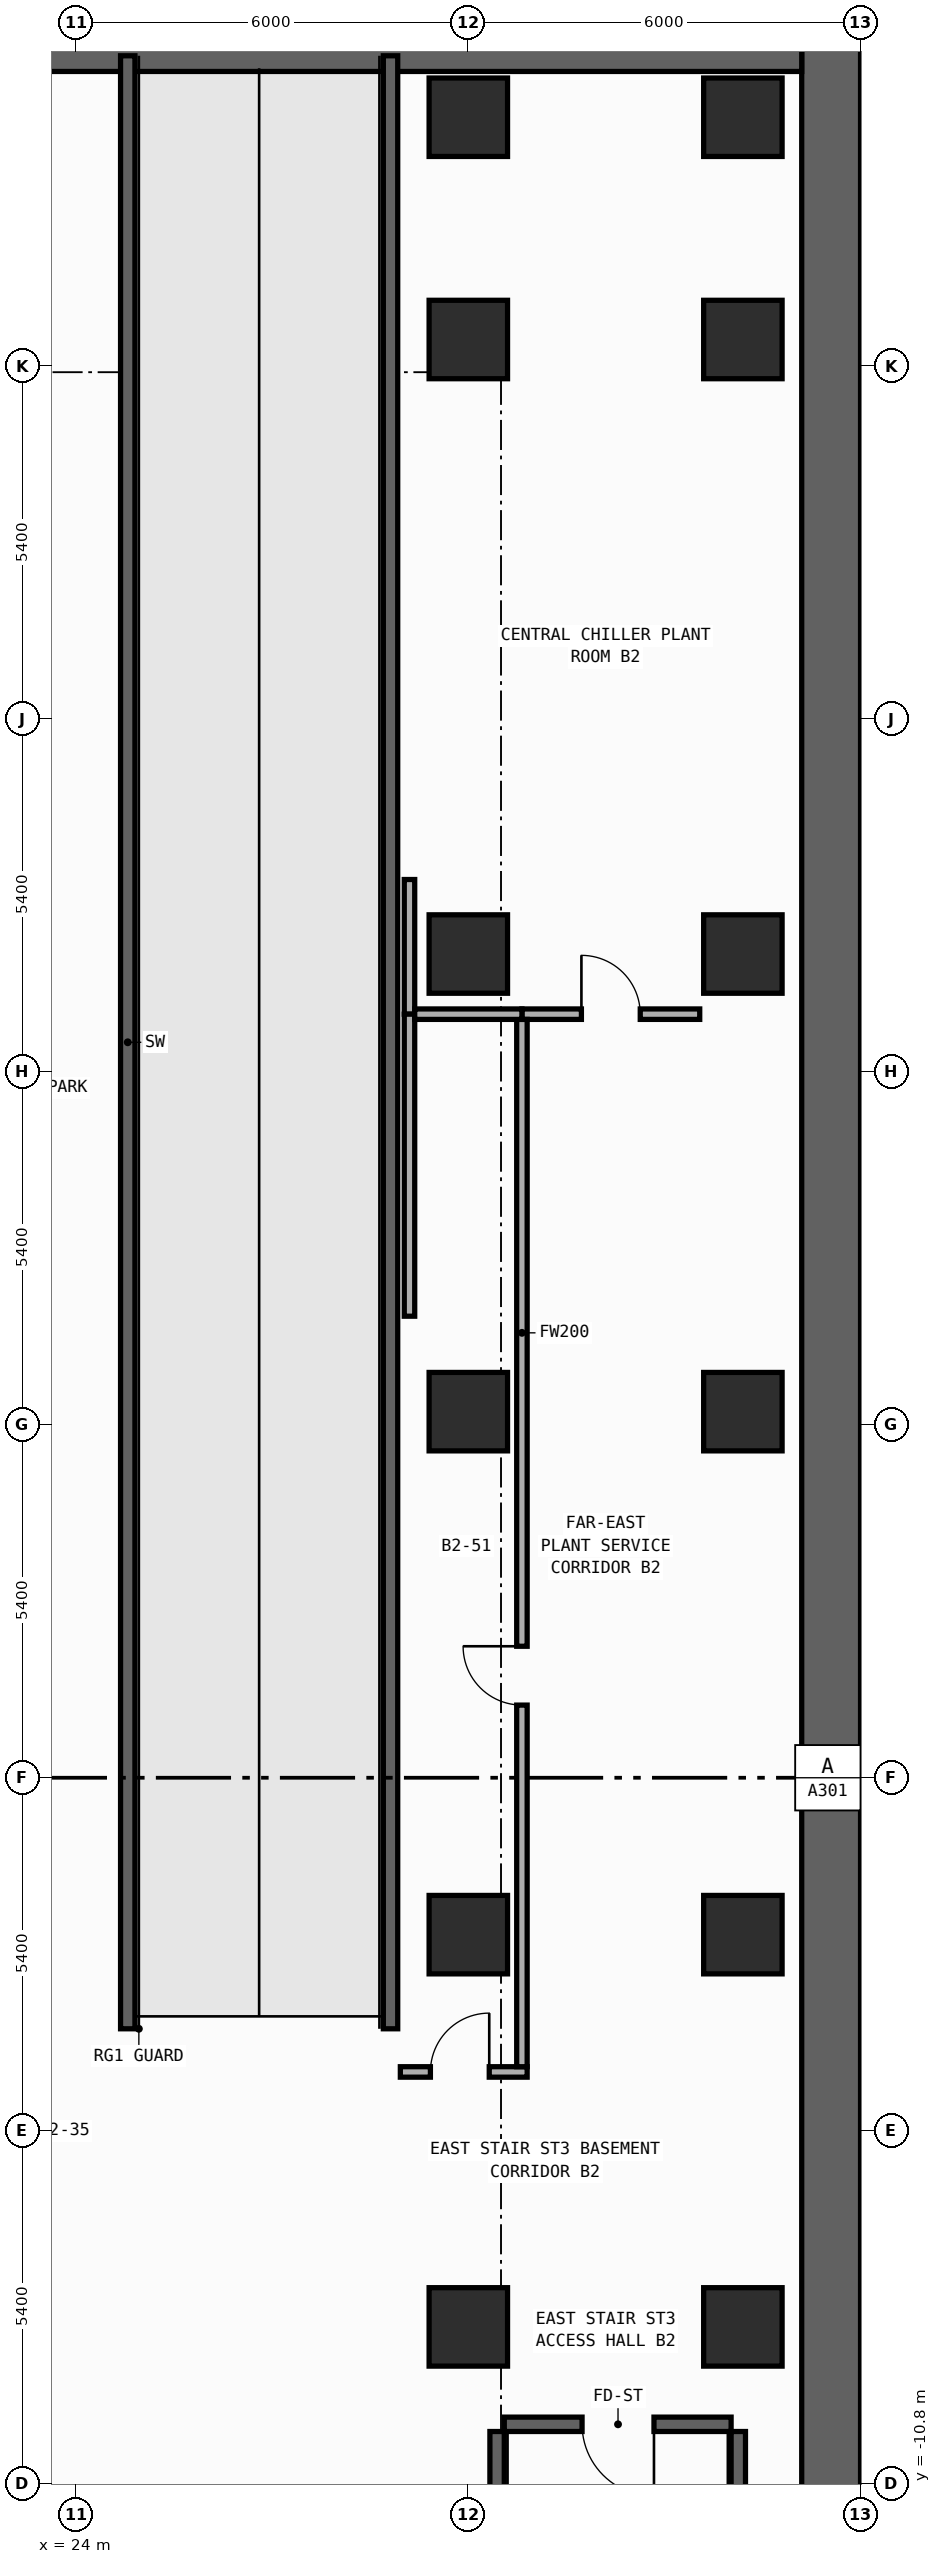
"""IFC4 building model, lengths in metres.
Left out: names, types, materials, properties, quantities, classifications, styles, units other than length and angle.
Written with IfcOpenShell. Run it as: python <this file> out.ifc"""

import sys

from ifc_helpers import new_model, si_unit, direction, frame, frame_2d, origin, origin_2d, place, context, subcontext, project, spatial, polyline, rectangle, outline, extrude, element, fill, save


model = new_model("IFC4")
c1 = context("Model", 3, precision=1e-05, world=origin(), true_north=direction((0.0, 1.0)))
c2 = subcontext(c1, "Body", "Model", "MODEL_VIEW")
j1 = project(units=[si_unit("LENGTHUNIT", "METRE"), si_unit("PLANEANGLEUNIT", "RADIAN")], contexts=[c1])
p1 = place(None, origin())
s1 = spatial("IfcSite", under=j1, at=p1, CompositionType="ELEMENT")
p2 = place(p1, origin())
s2 = spatial("IfcBuilding", under=s1, at=p2, CompositionType="ELEMENT")
p3 = place(p2, frame((0.0, 0.0, -9.0)))
s3 = spatial("IfcBuildingStorey", under=s2, at=p3, CompositionType="ELEMENT", Elevation=-9.0)
p4 = place(p3, frame((34.02, -9.89, 0.0), z_axis=(0.0, 0.0, 1.0), x_axis=(-1.0, 0.0, 0.0)))
e1 = element("IfcWall", 1, at=p4, inside=s3, PredefinedType="SHEAR", context=c2, shape_type="SweptSolid", body=[
    extrude(rectangle(XDim=3.47, YDim=0.22, at=frame_2d((1.735, 0.0))), origin(), (0.0, 0.0, 1.0), 4.2),
])
p5 = place(p4, frame((1.18, 0.0, 0.0)))
e2 = element("IfcOpeningElement", 2, at=p5, cuts=e1, PredefinedType="OPENING", context=c2, shape_type="SweptSolid", body=[
    extrude(rectangle(XDim=1.1, YDim=2.2, at=frame_2d((0.55, 1.1))), frame((0.0, 0.12, 0.0), z_axis=(0.0, -1.0, 0.0), x_axis=(1.0, 0.0, 0.0)), (0.0, 0.0, 1.0), 0.24),
])
for number, where, z_axis, x_axis in (
    (3, (30.44, -19.8, 0.0), (0.0, 0.0, 1.0), (0.0, 1.0, 0.0)),
    (4, (34.13, -19.8, 0.0), (0.0, 0.0, 1.0), (0.0, 1.0, 0.0)),
):
    element("IfcWall", number, at=place(p3, frame(where, z_axis=z_axis, x_axis=x_axis)), inside=s3, PredefinedType="SHEAR", context=c2, shape_type="SweptSolid", body=[
        extrude(rectangle(XDim=9.8, YDim=0.22, at=frame_2d((4.9, 0.0))), origin(), (0.0, 0.0, 1.0), 4.2),
    ])
p6 = place(p3, frame((35.55, -27.0, 0.0), z_axis=(0.0, 0.0, 1.0), x_axis=(0.0, 1.0, 0.0)))
e5 = element("IfcWall", 5, at=p6, inside=s3, PredefinedType="SHEAR", context=c2, shape_type="SweptSolid", body=[
    extrude(rectangle(XDim=54.0, YDim=0.9, at=frame_2d((27.0, 0.0))), origin(), (0.0, 0.0, 1.0), 4.2),
])
p7 = place(p3, frame((-35.1, 26.55, 0.0), z_axis=(0.0, 0.0, 1.0), x_axis=(1.0, 0.0, 0.0)))
e6 = element("IfcWall", 6, at=p7, inside=s3, PredefinedType="SHEAR", context=c2, shape_type="SweptSolid", body=[
    extrude(rectangle(XDim=70.2, YDim=0.9, at=frame_2d((35.1, 0.0))), origin(), (0.0, 0.0, 1.0), 4.2),
])
for number, where, z_axis, x_axis in (
    (7, (30.0, -8.4, 0.0), (0.0, 0.0, 1.0), (1.0, 0.0, 0.0)),
    (8, (30.0, -2.4, 0.0), (0.0, 0.0, 1.0), (1.0, 0.0, 0.0)),
    (9, (30.0, 5.6, 0.0), (0.0, 0.0, 1.0), (1.0, 0.0, 0.0)),
    (10, (30.0, 12.6, 0.0), (0.0, 0.0, 1.0), (1.0, 0.0, 0.0)),
    (11, (30.0, 22.0, 0.0), (0.0, 0.0, 1.0), (1.0, 0.0, 0.0)),
    (12, (30.0, 25.4, 0.0), (0.0, 0.0, 1.0), (1.0, 0.0, 0.0)),
    (13, (34.2, -8.4, 0.0), (0.0, 0.0, 1.0), (1.0, 0.0, 0.0)),
    (14, (34.2, -2.4, 0.0), (0.0, 0.0, 1.0), (1.0, 0.0, 0.0)),
    (15, (34.2, 5.6, 0.0), (0.0, 0.0, 1.0), (1.0, 0.0, 0.0)),
    (16, (34.2, 12.6, 0.0), (0.0, 0.0, 1.0), (1.0, 0.0, 0.0)),
    (17, (34.2, 22.0, 0.0), (0.0, 0.0, 1.0), (1.0, 0.0, 0.0)),
    (18, (34.2, 25.4, 0.0), (0.0, 0.0, 1.0), (1.0, 0.0, 0.0)),
):
    element("IfcColumn", number, at=place(p3, frame(where, z_axis=z_axis, x_axis=x_axis)), inside=s3, PredefinedType="COLUMN", context=c2, shape_type="SweptSolid", body=[
        extrude(rectangle(XDim=1.2, YDim=1.2, at=origin_2d()), origin(), (0.0, 0.0, 1.0), 4.5),
    ])
for number, where, z_axis, x_axis in (
    (19, (24.79, -3.84, 0.0), (0.0, 0.0, 1.0), (0.0, 1.0, 0.0)),
    (20, (28.81, -3.84, 0.0), (0.0, 0.0, 1.0), (0.0, 1.0, 0.0)),
):
    element("IfcWall", number, at=place(p3, frame(where, z_axis=z_axis, x_axis=x_axis)), inside=s3, PredefinedType="SHEAR", context=c2, shape_type="SweptSolid", body=[
        extrude(outline(polyline([(0.0, 0.0), (30.18, 0.0), (30.18, 4.2), (0.0, 0.02), (0.0, 0.0)])), frame((0.0, 0.11, 0.0), z_axis=(0.0, -1.0, 0.0), x_axis=(1.0, 0.0, 0.0)), (0.0, 0.0, 1.0), 0.22),
    ])
p8 = place(p3, frame((29.1, 11.68, 0.0), z_axis=(0.0, 0.0, 1.0), x_axis=(0.0, 1.0, 0.0)))
e21 = element("IfcWall", 21, at=p8, inside=s3, PredefinedType="PARTITIONING", context=c2, shape_type="SweptSolid", body=[
    extrude(rectangle(XDim=2.06, YDim=0.16, at=frame_2d((1.03, 0.0))), origin(), (0.0, 0.0, 1.0), 4.2),
])
p9 = place(p3, frame((29.1, 7.06, 0.0), z_axis=(0.0, 0.0, 1.0), x_axis=(0.0, 1.0, 0.0)))
e22 = element("IfcWall", 22, at=p9, inside=s3, PredefinedType="PARTITIONING", context=c2, shape_type="SweptSolid", body=[
    extrude(rectangle(XDim=4.62, YDim=0.16, at=frame_2d((2.31, 0.0))), origin(), (0.0, 0.0, 1.0), 4.2),
])
p10 = place(p3, frame((28.96, -4.5, 0.0), z_axis=(0.0, 0.0, 1.0), x_axis=(1.0, 0.0, 0.0)))
e23 = element("IfcWall", 23, at=p10, inside=s3, PredefinedType="PARTITIONING", context=c2, shape_type="SweptSolid", body=[
    extrude(rectangle(XDim=1.94, YDim=0.16, at=frame_2d((0.97, 0.0))), origin(), (0.0, 0.0, 1.0), 4.2),
])
p11 = place(p10, frame((0.46, 0.0, 0.0)))
e24 = element("IfcOpeningElement", 24, at=p11, cuts=e23, PredefinedType="OPENING", context=c2, shape_type="SweptSolid", body=[
    extrude(rectangle(XDim=0.9, YDim=2.15, at=frame_2d((0.45, 1.075))), frame((0.0, 0.09, 0.0), z_axis=(0.0, -1.0, 0.0), x_axis=(1.0, 0.0, 0.0)), (0.0, 0.0, 1.0), 0.18),
])
p12 = place(p3, frame((30.82, 11.68, 0.0), z_axis=(0.0, 0.0, 1.0), x_axis=(1.0, 0.0, 0.0)))
e25 = element("IfcWall", 25, at=p12, inside=s3, PredefinedType="PARTITIONING", context=c2, shape_type="SweptSolid", body=[
    extrude(rectangle(XDim=2.72, YDim=0.16, at=frame_2d((1.36, 0.0))), origin(), (0.0, 0.0, 1.0), 4.2),
])
p13 = place(p12, frame((0.91, 0.0, 0.0)))
e26 = element("IfcOpeningElement", 26, at=p13, cuts=e25, PredefinedType="OPENING", context=c2, shape_type="SweptSolid", body=[
    extrude(rectangle(XDim=0.9, YDim=2.15, at=frame_2d((0.45, 1.075))), frame((0.0, 0.09, 0.0), z_axis=(0.0, -1.0, 0.0), x_axis=(1.0, 0.0, 0.0)), (0.0, 0.0, 1.0), 0.18),
])
p14 = place(p3, frame((30.82, -4.42, 0.0), z_axis=(0.0, 0.0, 1.0), x_axis=(0.0, 1.0, 0.0)))
e27 = element("IfcWall", 27, at=p14, inside=s3, PredefinedType="PARTITIONING", context=c2, shape_type="SweptSolid", body=[
    extrude(rectangle(XDim=16.02, YDim=0.16, at=frame_2d((8.01, 0.0))), origin(), (0.0, 0.0, 1.0), 4.2),
])
p15 = place(p14, frame((5.531, 0.0, 0.0)))
e28 = element("IfcOpeningElement", 28, at=p15, cuts=e27, PredefinedType="OPENING", context=c2, shape_type="SweptSolid", body=[
    extrude(rectangle(XDim=0.9, YDim=2.15, at=frame_2d((0.45, 1.075))), frame((0.0, 0.09, 0.0), z_axis=(0.0, -1.0, 0.0), x_axis=(1.0, 0.0, 0.0)), (0.0, 0.0, 1.0), 0.18),
])
p16 = place(p3, frame((29.18, 11.68, 0.0), z_axis=(0.0, 0.0, 1.0), x_axis=(1.0, 0.0, 0.0)))
e29 = element("IfcWall", 29, at=p16, inside=s3, PredefinedType="PARTITIONING", context=c2, shape_type="SweptSolid", body=[
    extrude(rectangle(XDim=1.64, YDim=0.16, at=frame_2d((0.82, 0.0))), origin(), (0.0, 0.0, 1.0), 4.2),
])
p17 = place(p5, origin())
e30 = element("IfcDoor", 30, at=p17, inside=s3, OperationType="SINGLE_SWING_LEFT", PredefinedType="DOOR", context=c2, shape_type="SweptSolid", body=[
    extrude(rectangle(XDim=1.1, YDim=2.2, at=frame_2d((0.55, 1.1))), frame((0.0, 0.025, 0.0), z_axis=(0.0, -1.0, 0.0), x_axis=(1.0, 0.0, 0.0)), (0.0, 0.0, 1.0), 0.05),
])
fill(e2, e30)
p18 = place(p11, origin())
e31 = element("IfcDoor", 31, at=p18, inside=s3, OperationType="SINGLE_SWING_RIGHT", PredefinedType="DOOR", context=c2, shape_type="SweptSolid", body=[
    extrude(rectangle(XDim=0.9, YDim=2.15, at=frame_2d((0.45, 1.075))), frame((0.0, 0.025, 0.0), z_axis=(0.0, -1.0, 0.0), x_axis=(1.0, 0.0, 0.0)), (0.0, 0.0, 1.0), 0.05),
])
fill(e24, e31)
p19 = place(p13, origin())
e32 = element("IfcDoor", 32, at=p19, inside=s3, OperationType="SINGLE_SWING_LEFT", PredefinedType="DOOR", context=c2, shape_type="SweptSolid", body=[
    extrude(rectangle(XDim=0.9, YDim=2.15, at=frame_2d((0.45, 1.075))), frame((0.0, 0.025, 0.0), z_axis=(0.0, -1.0, 0.0), x_axis=(1.0, 0.0, 0.0)), (0.0, 0.0, 1.0), 0.05),
])
fill(e26, e32)
p20 = place(p15, origin())
e33 = element("IfcDoor", 33, at=p20, inside=s3, OperationType="SINGLE_SWING_RIGHT", PredefinedType="DOOR", context=c2, shape_type="SweptSolid", body=[
    extrude(rectangle(XDim=0.9, YDim=2.15, at=frame_2d((0.45, 1.075))), frame((0.0, 0.025, 0.0), z_axis=(0.0, -1.0, 0.0), x_axis=(1.0, 0.0, 0.0)), (0.0, 0.0, 1.0), 0.05),
])
fill(e28, e33)
save(model, sys.argv[1])
